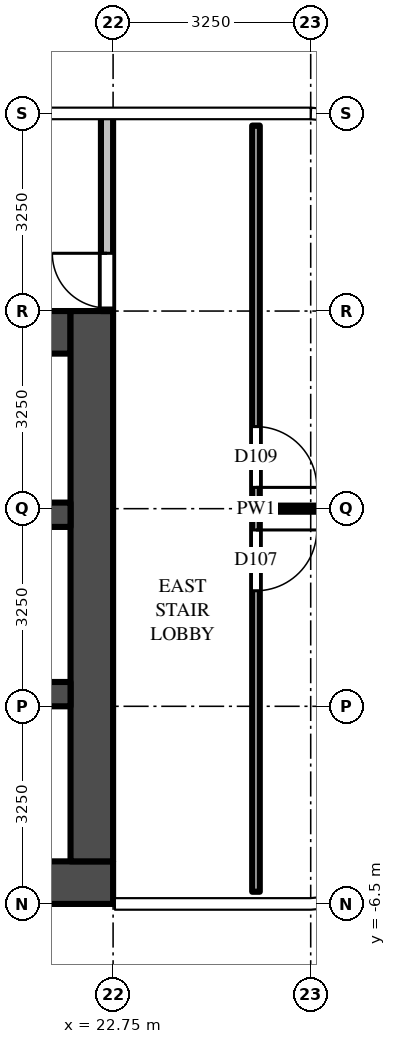
"""IFC4 building model, lengths in metres.
Left out: names, types, materials, properties, quantities, classifications, styles, units other than length and angle.
Written with IfcOpenShell. Run it as: python <this file> out.ifc"""

import sys

from ifc_helpers import new_model, si_unit, direction, frame, frame_2d, origin, place, context, subcontext, project, spatial, rectangle, extrude, source, transform, mapped, element, fill, save


model = new_model("IFC4")
c1 = context("Model", 3, precision=1e-05, world=origin(), true_north=direction((0.0, 1.0)))
c2 = subcontext(c1, "Body", "Model", "MODEL_VIEW")
j1 = project(units=[si_unit("LENGTHUNIT", "METRE"), si_unit("PLANEANGLEUNIT", "RADIAN")], contexts=[c1])
p1 = place(None, origin())
s1 = spatial("IfcSite", under=j1, at=p1, CompositionType="ELEMENT")
p2 = place(p1, origin())
s2 = spatial("IfcBuilding", under=s1, at=p2, CompositionType="ELEMENT")
p3 = place(p2, frame((0.0, 0.0, 142.5)))
s3 = spatial("IfcBuildingStorey", under=s2, at=p3, CompositionType="ELEMENT", Elevation=142.5)
m1 = source(origin(), c2, "Body", "SweptSolid", [
    extrude(rectangle(XDim=16.5, YDim=0.7, at=frame_2d((8.25, 0.0))), origin(), (0.0, 0.0, 1.0), 4.25),
])
p4 = place(p3, frame((6.25, -6.15, 0.0), z_axis=(0.0, 0.0, 1.0), x_axis=(1.0, 0.0, 0.0)))
e1 = element("IfcWall", 1, at=p4, inside=s3, PredefinedType="SHEAR", context=c2, shape_type="MappedRepresentation", body=[
    mapped(m1, transform((0.0, 0.0, 0.0))),
])
m2 = source(origin(), c2, "Body", "SweptSolid", [
    extrude(rectangle(XDim=14.85, YDim=0.7, at=frame_2d((7.425, 0.0))), origin(), (0.0, 0.0, 1.0), 4.25),
])
p5 = place(p3, frame((7.2, 2.9, 0.0), z_axis=(0.0, 0.0, 1.0), x_axis=(1.0, 0.0, 0.0)))
e2 = element("IfcWall", 2, at=p5, inside=s3, PredefinedType="SHEAR", context=c2, shape_type="MappedRepresentation", body=[
    mapped(m2, transform((0.0, 0.0, 0.0))),
])
m3 = source(origin(), c2, "Body", "SweptSolid", [
    extrude(rectangle(XDim=1.3, YDim=2.1, at=frame_2d((0.65, 1.05))), frame((0.0, 0.36, 0.0), z_axis=(0.0, -1.0, 0.0), x_axis=(1.0, 0.0, 0.0)), (0.0, 0.0, 1.0), 0.72),
])
p6 = place(p5, frame((12.2, 0.0, 0.0)))
e3 = element("IfcOpeningElement", 3, at=p6, cuts=e2, PredefinedType="OPENING", context=c2, shape_type="MappedRepresentation", body=[
    mapped(m3, transform((0.0, 0.0, 0.0))),
])
m4 = source(origin(), c2, "Body", "SweptSolid", [
    extrude(rectangle(XDim=1.2, YDim=2.1, at=frame_2d((0.6, 1.05))), frame((0.0, 0.36, 0.0), z_axis=(0.0, -1.0, 0.0), x_axis=(1.0, 0.0, 0.0)), (0.0, 0.0, 1.0), 0.72),
])
p7 = place(p5, frame((9.85, 0.0, 0.0)))
e4 = element("IfcOpeningElement", 4, at=p7, cuts=e2, PredefinedType="OPENING", context=c2, shape_type="MappedRepresentation", body=[
    mapped(m4, transform((0.0, 0.0, 0.0))),
])
m5 = source(origin(), c2, "Body", "SweptSolid", [
    extrude(rectangle(XDim=1.0, YDim=2.1, at=frame_2d((0.5, 1.05))), frame((0.0, 0.36, 0.0), z_axis=(0.0, -1.0, 0.0), x_axis=(1.0, 0.0, 0.0)), (0.0, 0.0, 1.0), 0.72),
])
p8 = place(p5, frame((7.9, 0.0, 0.0)))
e5 = element("IfcOpeningElement", 5, at=p8, cuts=e2, PredefinedType="OPENING", context=c2, shape_type="MappedRepresentation", body=[
    mapped(m5, transform((0.0, 0.0, 0.0))),
])
m6 = source(origin(), c2, "Body", "SweptSolid", [
    extrude(rectangle(XDim=0.8, YDim=2.1, at=frame_2d((0.4, 1.05))), frame((0.0, 0.36, 0.0), z_axis=(0.0, -1.0, 0.0), x_axis=(1.0, 0.0, 0.0)), (0.0, 0.0, 1.0), 0.72),
])
p9 = place(p5, frame((0.113, 0.0, 0.0)))
e6 = element("IfcOpeningElement", 6, at=p9, cuts=e2, PredefinedType="OPENING", context=c2, shape_type="MappedRepresentation", body=[
    mapped(m6, transform((0.0, 0.0, 0.0))),
])
p10 = place(p5, frame((1.288, 0.0, 0.0)))
e7 = element("IfcOpeningElement", 7, at=p10, cuts=e2, PredefinedType="OPENING", context=c2, shape_type="MappedRepresentation", body=[
    mapped(m6, transform((0.0, 0.0, 0.0))),
])
p11 = place(p5, frame((2.712, 0.0, 0.0)))
e8 = element("IfcOpeningElement", 8, at=p11, cuts=e2, PredefinedType="OPENING", context=c2, shape_type="MappedRepresentation", body=[
    mapped(m6, transform((0.0, 0.0, 0.0))),
])
p12 = place(p5, frame((3.887, 0.0, 0.0)))
e9 = element("IfcOpeningElement", 9, at=p12, cuts=e2, PredefinedType="OPENING", context=c2, shape_type="MappedRepresentation", body=[
    mapped(m6, transform((0.0, 0.0, 0.0))),
])
p13 = place(p5, frame((5.312, 0.0, 0.0)))
e10 = element("IfcOpeningElement", 10, at=p13, cuts=e2, PredefinedType="OPENING", context=c2, shape_type="MappedRepresentation", body=[
    mapped(m6, transform((0.0, 0.0, 0.0))),
])
p14 = place(p5, frame((6.488, 0.0, 0.0)))
e11 = element("IfcOpeningElement", 11, at=p14, cuts=e2, PredefinedType="OPENING", context=c2, shape_type="MappedRepresentation", body=[
    mapped(m6, transform((0.0, 0.0, 0.0))),
])
m7 = source(origin(), c2, "Body", "SweptSolid", [
    extrude(rectangle(XDim=9.05, YDim=0.7, at=frame_2d((4.525, 0.0))), origin(), (0.0, 0.0, 1.0), 4.25),
])
p15 = place(p3, frame((22.4, -5.8, 0.0), z_axis=(0.0, 0.0, 1.0), x_axis=(0.0, 1.0, 0.0)))
e12 = element("IfcWall", 12, at=p15, inside=s3, PredefinedType="SHEAR", context=c2, shape_type="MappedRepresentation", body=[
    mapped(m7, transform((0.0, 0.0, 0.0))),
])
m8 = source(origin(), c2, "Body", "SweptSolid", [
    extrude(rectangle(XDim=14.85, YDim=0.4, at=frame_2d((7.425, 0.0))), origin(), (0.0, 0.0, 1.0), 4.25),
])
p16 = place(p3, frame((7.2, -0.1, 0.0), z_axis=(0.0, 0.0, 1.0), x_axis=(1.0, 0.0, 0.0)))
e13 = element("IfcWall", 13, at=p16, inside=s3, PredefinedType="SHEAR", context=c2, shape_type="MappedRepresentation", body=[
    mapped(m8, transform((0.0, 0.0, 0.0))),
])
m9 = source(origin(), c2, "Body", "SweptSolid", [
    extrude(rectangle(XDim=1.0, YDim=2.1, at=frame_2d((0.5, 1.05))), frame((0.0, 0.21, 0.0), z_axis=(0.0, -1.0, 0.0), x_axis=(1.0, 0.0, 0.0)), (0.0, 0.0, 1.0), 0.42),
])
p17 = place(p16, frame((7.9, 0.0, 0.0)))
e14 = element("IfcOpeningElement", 14, at=p17, cuts=e13, PredefinedType="OPENING", context=c2, shape_type="MappedRepresentation", body=[
    mapped(m9, transform((0.0, 0.0, 0.0))),
])
m10 = source(origin(), c2, "Body", "SweptSolid", [
    extrude(rectangle(XDim=5.7, YDim=0.4, at=frame_2d((2.85, 0.0))), origin(), (0.0, 0.0, 1.0), 4.25),
])
p18 = place(p3, frame((16.35, -3.05, 0.0), z_axis=(0.0, 0.0, 1.0), x_axis=(1.0, 0.0, 0.0)))
e15 = element("IfcWall", 15, at=p18, inside=s3, PredefinedType="SHEAR", context=c2, shape_type="MappedRepresentation", body=[
    mapped(m10, transform((0.0, 0.0, 0.0))),
])
m11 = source(origin(), c2, "Body", "SweptSolid", [
    extrude(rectangle(XDim=3.25, YDim=0.2, at=frame_2d((1.625, 0.0))), origin(), (0.0, 0.0, 1.0), 4.25),
])
p19 = place(p3, frame((22.65, 3.25, 0.0), z_axis=(0.0, 0.0, 1.0), x_axis=(0.0, 1.0, 0.0)))
e16 = element("IfcWall", 16, at=p19, inside=s3, PredefinedType="PARTITIONING", context=c2, shape_type="MappedRepresentation", body=[
    mapped(m11, transform((0.0, 0.0, 0.0))),
])
m12 = source(origin(), c2, "Body", "SweptSolid", [
    extrude(rectangle(XDim=0.9, YDim=2.1, at=frame_2d((0.45, 1.05))), frame((0.0, 0.11, 0.0), z_axis=(0.0, -1.0, 0.0), x_axis=(1.0, 0.0, 0.0)), (0.0, 0.0, 1.0), 0.22),
])
p20 = place(p19, frame((0.05, 0.0, 0.0)))
e17 = element("IfcOpeningElement", 17, at=p20, cuts=e16, PredefinedType="OPENING", context=c2, shape_type="MappedRepresentation", body=[
    mapped(m12, transform((0.0, 0.0, 0.0))),
])
m13 = source(origin(), c2, "Body", "SweptSolid", [
    extrude(rectangle(XDim=12.6, YDim=0.125, at=frame_2d((6.3, 0.0))), origin(), (0.0, 0.0, 1.0), 3.33),
])
p21 = place(p3, frame((25.1, 6.3, 0.0), z_axis=(0.0, 0.0, 1.0), x_axis=(0.0, -1.0, 0.0)))
e18 = element("IfcWall", 18, at=p21, inside=s3, PredefinedType="PARTITIONING", context=c2, shape_type="MappedRepresentation", body=[
    mapped(m13, transform((0.0, 0.0, 0.0))),
])
m14 = source(origin(), c2, "Body", "SweptSolid", [
    extrude(rectangle(XDim=1.0, YDim=2.1, at=frame_2d((0.5, 1.05))), frame((0.0, 0.073, 0.0), z_axis=(0.0, -1.0, 0.0), x_axis=(1.0, 0.0, 0.0)), (0.0, 0.0, 1.0), 0.145),
])
p22 = place(p21, frame((6.65, 0.0, 0.0)))
e19 = element("IfcOpeningElement", 19, at=p22, cuts=e18, PredefinedType="OPENING", context=c2, shape_type="MappedRepresentation", body=[
    mapped(m14, transform((0.0, 0.0, 0.0))),
])
p23 = place(p21, frame((4.95, 0.0, 0.0)))
e20 = element("IfcOpeningElement", 20, at=p23, cuts=e18, PredefinedType="OPENING", context=c2, shape_type="MappedRepresentation", body=[
    mapped(m14, transform((0.0, 0.0, 0.0))),
])
m15 = source(origin(), c2, "Body", "SweptSolid", [
    extrude(rectangle(XDim=3.887, YDim=0.1, at=frame_2d((1.944, 0.0))), origin(), (0.0, 0.0, 1.0), 3.33),
])
p24 = place(p3, frame((25.163, 0.0, 0.0), z_axis=(0.0, 0.0, 1.0), x_axis=(1.0, 0.0, 0.0)))
e21 = element("IfcWall", 21, at=p24, inside=s3, PredefinedType="PARTITIONING", context=c2, shape_type="MappedRepresentation", body=[
    mapped(m15, transform((0.0, 0.0, 0.0))),
])
m16 = source(origin(), c2, "Body", "SweptSolid", [
    extrude(rectangle(XDim=0.9, YDim=2.1, at=frame_2d((0.45, 1.05))), frame((0.0, 0.025, 0.0), z_axis=(0.0, -1.0, 0.0), x_axis=(1.0, 0.0, 0.0)), (0.0, 0.0, 1.0), 0.05),
])
p25 = place(p20, origin())
e22 = element("IfcDoor", 22, at=p25, inside=s3, OperationType="SINGLE_SWING_RIGHT", PredefinedType="DOOR", context=c2, shape_type="MappedRepresentation", body=[
    mapped(m16, transform((0.0, 0.0, 0.0))),
])
fill(e17, e22)
m17 = source(origin(), c2, "Body", "SweptSolid", [
    extrude(rectangle(XDim=1.0, YDim=2.1, at=frame_2d((0.5, 1.05))), frame((0.0, 0.025, 0.0), z_axis=(0.0, -1.0, 0.0), x_axis=(1.0, 0.0, 0.0)), (0.0, 0.0, 1.0), 0.05),
])
p26 = place(p22, origin())
e23 = element("IfcDoor", 23, at=p26, inside=s3, OperationType="SINGLE_SWING_LEFT", PredefinedType="DOOR", context=c2, shape_type="MappedRepresentation", body=[
    mapped(m17, transform((0.0, 0.0, 0.0))),
])
fill(e19, e23)
p27 = place(p23, origin())
e24 = element("IfcDoor", 24, at=p27, inside=s3, OperationType="SINGLE_SWING_RIGHT", PredefinedType="DOOR", context=c2, shape_type="MappedRepresentation", body=[
    mapped(m17, transform((0.0, 0.0, 0.0))),
])
fill(e20, e24)
save(model, sys.argv[1])
